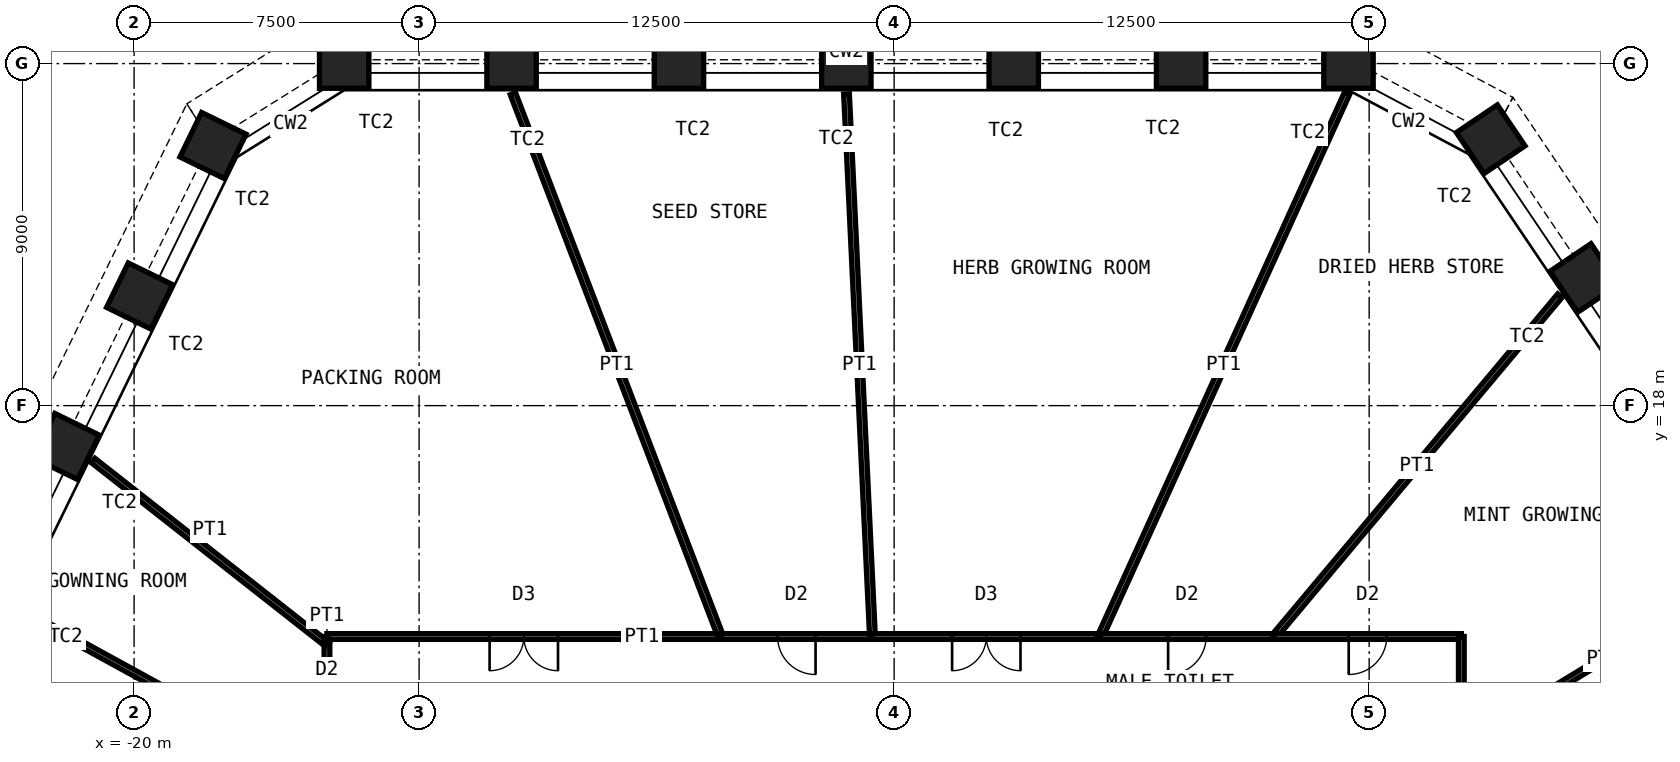
"""IFC4 building model, lengths in metres.
Left out: names, types, materials, properties, quantities, classifications, styles, units other than length and angle.
Written with IfcOpenShell. Run it as: python <this file> out.ifc"""

import sys

from ifc_helpers import new_model, si_unit, direction, frame, frame_2d, origin, origin_2d, place, context, subcontext, project, spatial, rectangle, hollow_rectangle, extrude, element, fill, save


model = new_model("IFC4")
c1 = context("Model", 3, precision=1e-05, world=origin(), true_north=direction((0.0, 1.0)))
c2 = subcontext(c1, "Body", "Model", "MODEL_VIEW")
j1 = project(units=[si_unit("LENGTHUNIT", "METRE"), si_unit("PLANEANGLEUNIT", "RADIAN")], contexts=[c1])
p1 = place(None, origin())
s1 = spatial("IfcSite", under=j1, at=p1, CompositionType="ELEMENT")
p2 = place(p1, origin())
s2 = spatial("IfcBuilding", under=s1, at=p2, CompositionType="ELEMENT")
p3 = place(p2, frame((0.0, 0.0, 57.0)))
s3 = spatial("IfcBuildingStorey", under=s2, at=p3, CompositionType="ELEMENT", Elevation=57.0)
for number, where, z_axis, x_axis in (
    (1, (-14.471, 27.0, 0.0), (0.0, 0.0, 1.0), (-1.0, 0.0, 0.0)),
    (2, (-10.067, 27.0, 0.0), (0.0, 0.0, 1.0), (-1.0, 0.0, 0.0)),
    (3, (-5.662, 27.0, 0.0), (0.0, 0.0, 1.0), (-1.0, 0.0, 0.0)),
    (4, (-1.258, 27.0, 0.0), (0.0, 0.0, 1.0), (-1.0, 0.0, 0.0)),
    (5, (3.147, 27.0, 0.0), (0.0, 0.0, 1.0), (-1.0, 0.0, 0.0)),
    (6, (7.552, 27.0, 0.0), (0.0, 0.0, 1.0), (-1.0, 0.0, 0.0)),
    (7, (11.956, 27.0, 0.0), (0.0, 0.0, 1.0), (-1.0, 0.0, 0.0)),
    (8, (15.698, 25.01, 0.0), (0.0, 0.0, 1.0), (-0.559, 0.829, 0.0)),
    (9, (18.161, 21.359, 0.0), (0.0, 0.0, 1.0), (-0.559, 0.829, 0.0)),
    (10, (-21.785, 16.925, 0.0), (0.0, 0.0, 1.0), (-0.438, -0.899, 0.0)),
    (11, (-19.854, 20.884, 0.0), (0.0, 0.0, 1.0), (-0.438, -0.899, 0.0)),
    (12, (-17.924, 24.843, 0.0), (0.0, 0.0, 1.0), (-0.438, -0.899, 0.0)),
):
    element("IfcColumn", number, at=place(p3, frame(where, z_axis=z_axis, x_axis=x_axis)), inside=s3, PredefinedType="COLUMN", context=c2, shape_type="SweptSolid", body=[
        extrude(hollow_rectangle(XDim=1.3, YDim=1.3, WallThickness=0.1, at=origin_2d()), origin(), (0.0, 0.0, 1.0), 5.0),
    ])
p4 = place(p3, frame((22.421, 13.612, 0.0), z_axis=(0.0, 0.0, 1.0), x_axis=(-0.854791484761, -0.518971596121, 0.0)))
e13 = element("IfcWall", 13, at=p4, inside=s3, PredefinedType="PARTITIONING", context=c2, shape_type="SweptSolid", body=[
    extrude(rectangle(XDim=8.77, YDim=0.15, at=frame_2d((4.385, 0.0))), origin(), (0.0, 0.0, 1.0), 3.7),
])
p5 = place(p3, frame((-22.999, 12.612, 0.0), z_axis=(0.0, 0.0, 1.0), x_axis=(0.876826470608, -0.480806967963, 0.0)))
e14 = element("IfcWall", 14, at=p5, inside=s3, PredefinedType="PARTITIONING", context=c2, shape_type="SweptSolid", body=[
    extrude(rectangle(XDim=9.208, YDim=0.15, at=frame_2d((4.604, 0.0))), origin(), (0.0, 0.0, 1.0), 3.7),
])
p6 = place(p3, frame((-14.925, 8.184, 0.0), z_axis=(0.0, 0.0, 1.0), x_axis=(0.0, 1.0, 0.0)))
e15 = element("IfcWall", 15, at=p6, inside=s3, PredefinedType="PARTITIONING", context=c2, shape_type="SweptSolid", body=[
    extrude(rectangle(XDim=3.54, YDim=0.15, at=frame_2d((1.77, 0.0))), origin(), (0.0, 0.0, 1.0), 4.8),
])
p7 = place(p6, frame((1.27, 0.0, 0.0)))
e16 = element("IfcOpeningElement", 16, at=p7, cuts=e15, PredefinedType="OPENING", context=c2, shape_type="SweptSolid", body=[
    extrude(rectangle(XDim=1.0, YDim=2.4, at=frame_2d((0.5, 1.2))), frame((0.0, 0.085, 0.0), z_axis=(0.0, -1.0, 0.0), x_axis=(1.0, 0.0, 0.0)), (0.0, 0.0, 1.0), 0.17),
])
p8 = place(p3, frame((-21.077, 16.557, 0.0), z_axis=(0.0, 0.0, 1.0), x_axis=(0.78639413325, -0.617725074115, 0.0)))
e17 = element("IfcWall", 17, at=p8, inside=s3, PredefinedType="PARTITIONING", context=c2, shape_type="SweptSolid", body=[
    extrude(rectangle(XDim=7.823, YDim=0.15, at=frame_2d((3.912, 0.0))), origin(), (0.0, 0.0, 1.0), 3.7),
])
p9 = place(p3, frame((-14.925, 11.819, 0.0), z_axis=(0.0, 0.0, 1.0), x_axis=(0.0, 1.0, 0.0)))
e18 = element("IfcWall", 18, at=p9, inside=s3, PredefinedType="PARTITIONING", context=c2, shape_type="SweptSolid", body=[
    extrude(rectangle(XDim=0.106, YDim=0.15, at=frame_2d((0.053, 0.0))), origin(), (0.0, 0.0, 1.0), 4.8),
])
p10 = place(p3, frame((-14.925, 11.925, 0.0), z_axis=(0.0, 0.0, 1.0), x_axis=(1.0, 0.0, 0.0)))
e19 = element("IfcWall", 19, at=p10, inside=s3, PredefinedType="PARTITIONING", context=c2, shape_type="SweptSolid", body=[
    extrude(rectangle(XDim=10.361, YDim=0.15, at=frame_2d((5.18, 0.0))), origin(), (0.0, 0.0, 1.0), 4.8),
])
p11 = place(p10, frame((4.28, 0.0, 0.0)))
e20 = element("IfcOpeningElement", 20, at=p11, cuts=e19, PredefinedType="OPENING", context=c2, shape_type="SweptSolid", body=[
    extrude(rectangle(XDim=1.8, YDim=2.4, at=frame_2d((0.9, 1.2))), frame((0.0, 0.085, 0.0), z_axis=(0.0, -1.0, 0.0), x_axis=(1.0, 0.0, 0.0)), (0.0, 0.0, 1.0), 0.17),
])
p12 = place(p3, frame((-10.031, 26.207, 0.0), z_axis=(0.0, 0.0, 1.0), x_axis=(0.357478701909, -0.933921290946, 0.0)))
e21 = element("IfcWall", 21, at=p12, inside=s3, PredefinedType="PARTITIONING", context=c2, shape_type="SweptSolid", body=[
    extrude(rectangle(XDim=15.292, YDim=0.15, at=frame_2d((7.646, 0.0))), origin(), (0.0, 0.0, 1.0), 3.7),
])
p13 = place(p3, frame((-4.564, 11.925, 0.0), z_axis=(0.0, 0.0, 1.0), x_axis=(1.0, 0.0, 0.0)))
e22 = element("IfcWall", 22, at=p13, inside=s3, PredefinedType="PARTITIONING", context=c2, shape_type="SweptSolid", body=[
    extrude(rectangle(XDim=3.994, YDim=0.15, at=frame_2d((1.997, 0.0))), origin(), (0.0, 0.0, 1.0), 4.8),
])
p14 = place(p13, frame((1.497, 0.0, 0.0)))
e23 = element("IfcOpeningElement", 23, at=p14, cuts=e22, PredefinedType="OPENING", context=c2, shape_type="SweptSolid", body=[
    extrude(rectangle(XDim=1.0, YDim=2.4, at=frame_2d((0.5, 1.2))), frame((0.0, 0.085, 0.0), z_axis=(0.0, -1.0, 0.0), x_axis=(1.0, 0.0, 0.0)), (0.0, 0.0, 1.0), 0.17),
])
p15 = place(p3, frame((-1.253, 26.2, 0.0), z_axis=(0.0, 0.0, 1.0), x_axis=(0.047763998943, -0.998858648861, 0.0)))
e24 = element("IfcWall", 24, at=p15, inside=s3, PredefinedType="PARTITIONING", context=c2, shape_type="SweptSolid", body=[
    extrude(rectangle(XDim=14.292, YDim=0.15, at=frame_2d((7.146, 0.0))), origin(), (0.0, 0.0, 1.0), 3.7),
])
p16 = place(p3, frame((-0.57, 11.925, 0.0), z_axis=(0.0, 0.0, 1.0), x_axis=(1.0, 0.0, 0.0)))
e25 = element("IfcWall", 25, at=p16, inside=s3, PredefinedType="PARTITIONING", context=c2, shape_type="SweptSolid", body=[
    extrude(rectangle(XDim=5.991, YDim=0.15, at=frame_2d((2.996, 0.0))), origin(), (0.0, 0.0, 1.0), 4.8),
])
p17 = place(p16, frame((2.096, 0.0, 0.0)))
e26 = element("IfcOpeningElement", 26, at=p17, cuts=e25, PredefinedType="OPENING", context=c2, shape_type="SweptSolid", body=[
    extrude(rectangle(XDim=1.8, YDim=2.4, at=frame_2d((0.9, 1.2))), frame((0.0, 0.085, 0.0), z_axis=(0.0, -1.0, 0.0), x_axis=(1.0, 0.0, 0.0)), (0.0, 0.0, 1.0), 0.17),
])
p18 = place(p3, frame((11.915, 26.209, 0.0), z_axis=(0.0, 0.0, 1.0), x_axis=(-0.4138533524, -0.910343563007, 0.0)))
e27 = element("IfcWall", 27, at=p18, inside=s3, PredefinedType="PARTITIONING", context=c2, shape_type="SweptSolid", body=[
    extrude(rectangle(XDim=15.691, YDim=0.15, at=frame_2d((7.845, 0.0))), origin(), (0.0, 0.0, 1.0), 3.7),
])
p19 = place(p3, frame((5.421, 11.925, 0.0), z_axis=(0.0, 0.0, 1.0), x_axis=(1.0, 0.0, 0.0)))
e28 = element("IfcWall", 28, at=p19, inside=s3, PredefinedType="PARTITIONING", context=c2, shape_type="SweptSolid", body=[
    extrude(rectangle(XDim=4.578, YDim=0.15, at=frame_2d((2.289, 0.0))), origin(), (0.0, 0.0, 1.0), 4.8),
])
p20 = place(p19, frame((1.789, 0.0, 0.0)))
e29 = element("IfcOpeningElement", 29, at=p20, cuts=e28, PredefinedType="OPENING", context=c2, shape_type="SweptSolid", body=[
    extrude(rectangle(XDim=1.0, YDim=2.4, at=frame_2d((0.5, 1.2))), frame((0.0, 0.085, 0.0), z_axis=(0.0, -1.0, 0.0), x_axis=(1.0, 0.0, 0.0)), (0.0, 0.0, 1.0), 0.17),
])
p21 = place(p3, frame((17.517, 20.891, 0.0), z_axis=(0.0, 0.0, 1.0), x_axis=(-0.642515050703, -0.766273064658, 0.0)))
e30 = element("IfcWall", 30, at=p21, inside=s3, PredefinedType="PARTITIONING", context=c2, shape_type="SweptSolid", body=[
    extrude(rectangle(XDim=11.7, YDim=0.15, at=frame_2d((5.85, 0.0))), origin(), (0.0, 0.0, 1.0), 3.7),
])
p22 = place(p3, frame((9.999, 11.925, 0.0), z_axis=(0.0, 0.0, 1.0), x_axis=(1.0, 0.0, 0.0)))
e31 = element("IfcWall", 31, at=p22, inside=s3, PredefinedType="PARTITIONING", context=c2, shape_type="SweptSolid", body=[
    extrude(rectangle(XDim=4.926, YDim=0.15, at=frame_2d((2.463, 0.0))), origin(), (0.0, 0.0, 1.0), 4.8),
])
p23 = place(p22, frame((1.963, 0.0, 0.0)))
e32 = element("IfcOpeningElement", 32, at=p23, cuts=e31, PredefinedType="OPENING", context=c2, shape_type="SweptSolid", body=[
    extrude(rectangle(XDim=1.0, YDim=2.4, at=frame_2d((0.5, 1.2))), frame((0.0, 0.085, 0.0), z_axis=(0.0, -1.0, 0.0), x_axis=(1.0, 0.0, 0.0)), (0.0, 0.0, 1.0), 0.17),
])
p24 = place(p3, frame((14.925, 11.925, 0.0), z_axis=(0.0, 0.0, 1.0), x_axis=(0.0, -1.0, 0.0)))
e33 = element("IfcWall", 33, at=p24, inside=s3, PredefinedType="PARTITIONING", context=c2, shape_type="SweptSolid", body=[
    extrude(rectangle(XDim=2.864, YDim=0.15, at=frame_2d((1.432, 0.0))), origin(), (0.0, 0.0, 1.0), 4.8),
])
p25 = place(p11, origin())
e34 = element("IfcDoor", 34, at=p25, inside=s3, OperationType="DOUBLE_DOOR_DOUBLE_SWING", PredefinedType="DOOR", context=c2, shape_type="SweptSolid", body=[
    extrude(rectangle(XDim=1.8, YDim=2.4, at=frame_2d((0.9, 1.2))), frame((0.0, 0.025, 0.0), z_axis=(0.0, -1.0, 0.0), x_axis=(1.0, 0.0, 0.0)), (0.0, 0.0, 1.0), 0.05),
])
fill(e20, e34)
p26 = place(p14, origin())
e35 = element("IfcDoor", 35, at=p26, inside=s3, OperationType="SINGLE_SWING_RIGHT", PredefinedType="DOOR", context=c2, shape_type="SweptSolid", body=[
    extrude(rectangle(XDim=1.0, YDim=2.4, at=frame_2d((0.5, 1.2))), frame((0.0, 0.025, 0.0), z_axis=(0.0, -1.0, 0.0), x_axis=(1.0, 0.0, 0.0)), (0.0, 0.0, 1.0), 0.05),
])
fill(e23, e35)
p27 = place(p17, origin())
e36 = element("IfcDoor", 36, at=p27, inside=s3, OperationType="DOUBLE_DOOR_DOUBLE_SWING", PredefinedType="DOOR", context=c2, shape_type="SweptSolid", body=[
    extrude(rectangle(XDim=1.8, YDim=2.4, at=frame_2d((0.9, 1.2))), frame((0.0, 0.025, 0.0), z_axis=(0.0, -1.0, 0.0), x_axis=(1.0, 0.0, 0.0)), (0.0, 0.0, 1.0), 0.05),
])
fill(e26, e36)
p28 = place(p20, origin())
e37 = element("IfcDoor", 37, at=p28, inside=s3, OperationType="SINGLE_SWING_LEFT", PredefinedType="DOOR", context=c2, shape_type="SweptSolid", body=[
    extrude(rectangle(XDim=1.0, YDim=2.4, at=frame_2d((0.5, 1.2))), frame((0.0, 0.025, 0.0), z_axis=(0.0, -1.0, 0.0), x_axis=(1.0, 0.0, 0.0)), (0.0, 0.0, 1.0), 0.05),
])
fill(e29, e37)
p29 = place(p23, origin())
e38 = element("IfcDoor", 38, at=p29, inside=s3, OperationType="SINGLE_SWING_LEFT", PredefinedType="DOOR", context=c2, shape_type="SweptSolid", body=[
    extrude(rectangle(XDim=1.0, YDim=2.4, at=frame_2d((0.5, 1.2))), frame((0.0, 0.025, 0.0), z_axis=(0.0, -1.0, 0.0), x_axis=(1.0, 0.0, 0.0)), (0.0, 0.0, 1.0), 0.05),
])
fill(e32, e38)
save(model, sys.argv[1])
